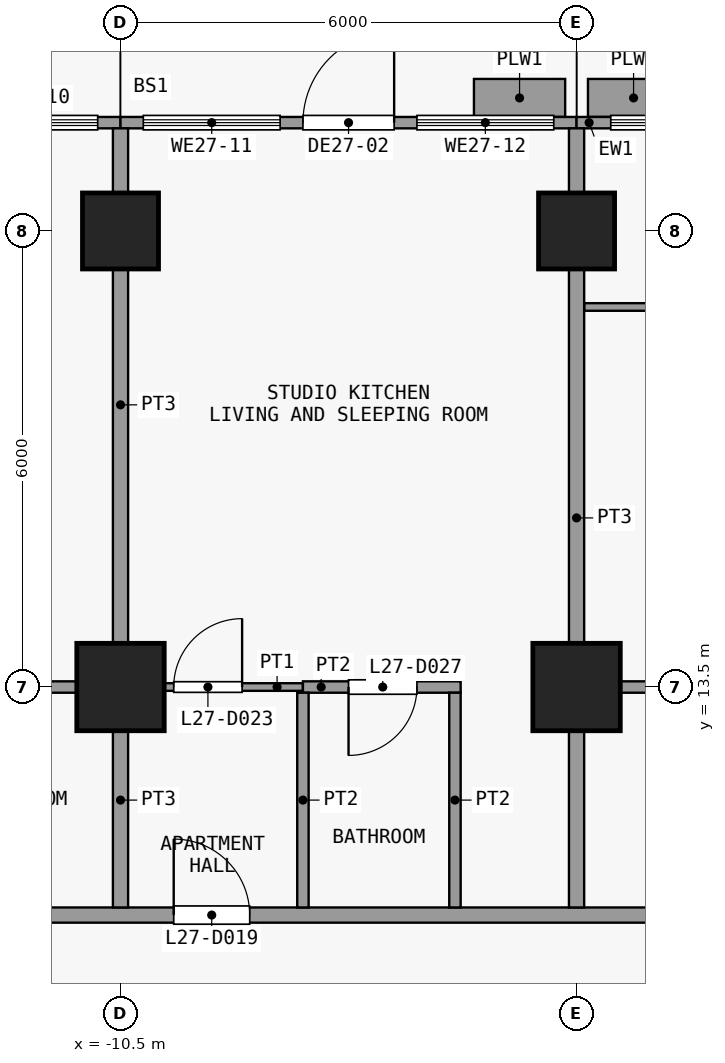
"""IFC4 building model, lengths in metres.
Left out: names, types, materials, properties, quantities, classifications, styles, units other than length and angle.
Written with IfcOpenShell. Run it as: python <this file> out.ifc"""

import sys

from ifc_helpers import new_model, si_unit, direction, frame, frame_2d, origin, origin_2d, place, context, subcontext, project, spatial, rectangle, extrude, element, fill, save


model = new_model("IFC4")
c1 = context("Model", 3, precision=1e-05, world=origin(), true_north=direction((0.0, 1.0)))
c2 = subcontext(c1, "Body", "Model", "MODEL_VIEW")
j1 = project(units=[si_unit("LENGTHUNIT", "METRE"), si_unit("PLANEANGLEUNIT", "RADIAN")], contexts=[c1])
p1 = place(None, origin())
s1 = spatial("IfcSite", under=j1, at=p1, CompositionType="ELEMENT")
p2 = place(p1, origin())
s2 = spatial("IfcBuilding", under=s1, at=p2, CompositionType="ELEMENT")
p3 = place(p2, frame((0.0, 0.0, 109.9)))
s3 = spatial("IfcBuildingStorey", under=s2, at=p3, CompositionType="ELEMENT", Elevation=109.9)
p4 = place(p3, frame((-10.5, 13.5, 0.0), z_axis=(0.0, 0.0, 1.0), x_axis=(1.0, 0.0, 0.0)))
e1 = element("IfcColumn", 1, at=p4, inside=s3, PredefinedType="COLUMN", context=c2, shape_type="SweptSolid", body=[
    extrude(rectangle(XDim=1.15, YDim=1.15, at=origin_2d()), origin(), (0.0, 0.0, 1.0), 3.6),
])
p5 = place(p3, frame((-10.5, 19.5, 0.0), z_axis=(0.0, 0.0, 1.0), x_axis=(1.0, 0.0, 0.0)))
e2 = element("IfcColumn", 2, at=p5, inside=s3, PredefinedType="COLUMN", context=c2, shape_type="SweptSolid", body=[
    extrude(rectangle(XDim=1.0, YDim=1.0, at=origin_2d()), origin(), (0.0, 0.0, 1.0), 3.6),
])
p6 = place(p3, frame((-4.5, 13.5, 0.0), z_axis=(0.0, 0.0, 1.0), x_axis=(1.0, 0.0, 0.0)))
e3 = element("IfcColumn", 3, at=p6, inside=s3, PredefinedType="COLUMN", context=c2, shape_type="SweptSolid", body=[
    extrude(rectangle(XDim=1.15, YDim=1.15, at=origin_2d()), origin(), (0.0, 0.0, 1.0), 3.6),
])
p7 = place(p3, frame((-4.5, 19.5, 0.0), z_axis=(0.0, 0.0, 1.0), x_axis=(1.0, 0.0, 0.0)))
e4 = element("IfcColumn", 4, at=p7, inside=s3, PredefinedType="COLUMN", context=c2, shape_type="SweptSolid", body=[
    extrude(rectangle(XDim=1.0, YDim=1.0, at=origin_2d()), origin(), (0.0, 0.0, 1.0), 3.6),
])
p8 = place(p3, frame((-16.425, 20.925, 0.0), z_axis=(0.0, 0.0, 1.0), x_axis=(1.0, 0.0, 0.0)))
e5 = element("IfcWall", 5, at=p8, inside=s3, PredefinedType="SOLIDWALL", context=c2, shape_type="SweptSolid", body=[
    extrude(rectangle(XDim=5.925, YDim=0.15, at=frame_2d((2.962, 0.0))), origin(), (0.0, 0.0, 1.0), 3.3),
])
p9 = place(p8, frame((2.325, 0.0, 0.0)))
e6 = element("IfcOpeningElement", 6, at=p9, cuts=e5, PredefinedType="OPENING", context=c2, shape_type="SweptSolid", body=[
    extrude(rectangle(XDim=1.2, YDim=2.4, at=frame_2d((0.6, 1.2))), frame((0.0, 0.085, 0.0), z_axis=(0.0, -1.0, 0.0), x_axis=(1.0, 0.0, 0.0)), (0.0, 0.0, 1.0), 0.17),
])
p10 = place(p8, frame((0.262, 0.0, 0.9)))
e7 = element("IfcOpeningElement", 7, at=p10, cuts=e5, PredefinedType="OPENING", context=c2, shape_type="SweptSolid", body=[
    extrude(rectangle(XDim=1.8, YDim=2.1, at=frame_2d((0.9, 1.05))), frame((0.0, 0.085, 0.0), z_axis=(0.0, -1.0, 0.0), x_axis=(1.0, 0.0, 0.0)), (0.0, 0.0, 1.0), 0.17),
])
p11 = place(p8, frame((3.825, 0.0, 0.9)))
e8 = element("IfcOpeningElement", 8, at=p11, cuts=e5, PredefinedType="OPENING", context=c2, shape_type="SweptSolid", body=[
    extrude(rectangle(XDim=1.8, YDim=2.1, at=frame_2d((0.9, 1.05))), frame((0.0, 0.085, 0.0), z_axis=(0.0, -1.0, 0.0), x_axis=(1.0, 0.0, 0.0)), (0.0, 0.0, 1.0), 0.17),
])
p12 = place(p3, frame((-10.5, 20.925, 0.0), z_axis=(0.0, 0.0, 1.0), x_axis=(1.0, 0.0, 0.0)))
e9 = element("IfcWall", 9, at=p12, inside=s3, PredefinedType="SOLIDWALL", context=c2, shape_type="SweptSolid", body=[
    extrude(rectangle(XDim=6.0, YDim=0.15, at=frame_2d((3.0, 0.0))), origin(), (0.0, 0.0, 1.0), 3.3),
])
p13 = place(p12, frame((2.4, 0.0, 0.0)))
e10 = element("IfcOpeningElement", 10, at=p13, cuts=e9, PredefinedType="OPENING", context=c2, shape_type="SweptSolid", body=[
    extrude(rectangle(XDim=1.2, YDim=2.4, at=frame_2d((0.6, 1.2))), frame((0.0, 0.085, 0.0), z_axis=(0.0, -1.0, 0.0), x_axis=(1.0, 0.0, 0.0)), (0.0, 0.0, 1.0), 0.17),
])
p14 = place(p12, frame((0.3, 0.0, 0.9)))
e11 = element("IfcOpeningElement", 11, at=p14, cuts=e9, PredefinedType="OPENING", context=c2, shape_type="SweptSolid", body=[
    extrude(rectangle(XDim=1.8, YDim=2.1, at=frame_2d((0.9, 1.05))), frame((0.0, 0.085, 0.0), z_axis=(0.0, -1.0, 0.0), x_axis=(1.0, 0.0, 0.0)), (0.0, 0.0, 1.0), 0.17),
])
p15 = place(p12, frame((3.9, 0.0, 0.9)))
e12 = element("IfcOpeningElement", 12, at=p15, cuts=e9, PredefinedType="OPENING", context=c2, shape_type="SweptSolid", body=[
    extrude(rectangle(XDim=1.8, YDim=2.1, at=frame_2d((0.9, 1.05))), frame((0.0, 0.085, 0.0), z_axis=(0.0, -1.0, 0.0), x_axis=(1.0, 0.0, 0.0)), (0.0, 0.0, 1.0), 0.17),
])
p16 = place(p3, frame((-5.85, 21.25, 0.0), z_axis=(0.0, 0.0, 1.0), x_axis=(1.0, 0.0, 0.0)))
e13 = element("IfcWall", 13, at=p16, inside=s3, PredefinedType="USERDEFINED", context=c2, shape_type="SweptSolid", body=[
    extrude(rectangle(XDim=1.2, YDim=0.5, at=frame_2d((0.6, 0.0))), origin(), (0.0, 0.0, 1.0), 0.9),
])
p17 = place(p3, frame((-4.5, 20.925, 0.0), z_axis=(0.0, 0.0, 1.0), x_axis=(1.0, 0.0, 0.0)))
e14 = element("IfcWall", 14, at=p17, inside=s3, PredefinedType="SOLIDWALL", context=c2, shape_type="SweptSolid", body=[
    extrude(rectangle(XDim=8.925, YDim=0.15, at=frame_2d((4.462, 0.0))), origin(), (0.0, 0.0, 1.0), 3.3),
])
p18 = place(p17, frame((3.9, 0.0, 0.0)))
e15 = element("IfcOpeningElement", 15, at=p18, cuts=e14, PredefinedType="OPENING", context=c2, shape_type="SweptSolid", body=[
    extrude(rectangle(XDim=1.2, YDim=2.4, at=frame_2d((0.6, 1.2))), frame((0.0, 0.085, 0.0), z_axis=(0.0, -1.0, 0.0), x_axis=(1.0, 0.0, 0.0)), (0.0, 0.0, 1.0), 0.17),
])
p19 = place(p17, frame((0.45, 0.0, 0.9)))
e16 = element("IfcOpeningElement", 16, at=p19, cuts=e14, PredefinedType="OPENING", context=c2, shape_type="SweptSolid", body=[
    extrude(rectangle(XDim=3.0, YDim=2.1, at=frame_2d((1.5, 1.05))), frame((0.0, 0.085, 0.0), z_axis=(0.0, -1.0, 0.0), x_axis=(1.0, 0.0, 0.0)), (0.0, 0.0, 1.0), 0.17),
])
p20 = place(p17, frame((5.512, 0.0, 0.9)))
e17 = element("IfcOpeningElement", 17, at=p20, cuts=e14, PredefinedType="OPENING", context=c2, shape_type="SweptSolid", body=[
    extrude(rectangle(XDim=3.0, YDim=2.1, at=frame_2d((1.5, 1.05))), frame((0.0, 0.085, 0.0), z_axis=(0.0, -1.0, 0.0), x_axis=(1.0, 0.0, 0.0)), (0.0, 0.0, 1.0), 0.17),
])
p21 = place(p3, frame((-4.35, 21.25, 0.0), z_axis=(0.0, 0.0, 1.0), x_axis=(1.0, 0.0, 0.0)))
e18 = element("IfcWall", 18, at=p21, inside=s3, PredefinedType="USERDEFINED", context=c2, shape_type="SweptSolid", body=[
    extrude(rectangle(XDim=1.2, YDim=0.5, at=frame_2d((0.6, 0.0))), origin(), (0.0, 0.0, 1.0), 0.9),
])
p22 = place(p3, frame((-23.85, 10.5, 0.0), z_axis=(0.0, 0.0, 1.0), x_axis=(1.0, 0.0, 0.0)))
e19 = element("IfcWall", 19, at=p22, inside=s3, PredefinedType="PARTITIONING", context=c2, shape_type="SweptSolid", body=[
    extrude(rectangle(XDim=47.7, YDim=0.2, at=frame_2d((23.85, 0.0))), origin(), (0.0, 0.0, 1.0), 3.3),
])
p23 = place(p22, frame((9.05, 0.0, 0.0)))
e20 = element("IfcOpeningElement", 20, at=p23, cuts=e19, PredefinedType="OPENING", context=c2, shape_type="SweptSolid", body=[
    extrude(rectangle(XDim=1.0, YDim=2.1, at=frame_2d((0.5, 1.05))), frame((0.0, 0.11, 0.0), z_axis=(0.0, -1.0, 0.0), x_axis=(1.0, 0.0, 0.0)), (0.0, 0.0, 1.0), 0.22),
])
p24 = place(p22, frame((14.05, 0.0, 0.0)))
e21 = element("IfcOpeningElement", 21, at=p24, cuts=e19, PredefinedType="OPENING", context=c2, shape_type="SweptSolid", body=[
    extrude(rectangle(XDim=1.0, YDim=2.1, at=frame_2d((0.5, 1.05))), frame((0.0, 0.11, 0.0), z_axis=(0.0, -1.0, 0.0), x_axis=(1.0, 0.0, 0.0)), (0.0, 0.0, 1.0), 0.22),
])
p25 = place(p22, frame((29.05, 0.0, 0.0)))
e22 = element("IfcOpeningElement", 22, at=p25, cuts=e19, PredefinedType="OPENING", context=c2, shape_type="SweptSolid", body=[
    extrude(rectangle(XDim=1.0, YDim=2.1, at=frame_2d((0.5, 1.05))), frame((0.0, 0.11, 0.0), z_axis=(0.0, -1.0, 0.0), x_axis=(1.0, 0.0, 0.0)), (0.0, 0.0, 1.0), 0.22),
])
p26 = place(p22, frame((41.05, 0.0, 0.0)))
e23 = element("IfcOpeningElement", 23, at=p26, cuts=e19, PredefinedType="OPENING", context=c2, shape_type="SweptSolid", body=[
    extrude(rectangle(XDim=1.0, YDim=2.1, at=frame_2d((0.5, 1.05))), frame((0.0, 0.11, 0.0), z_axis=(0.0, -1.0, 0.0), x_axis=(1.0, 0.0, 0.0)), (0.0, 0.0, 1.0), 0.22),
])
p27 = place(p3, frame((-10.5, 13.5, 0.0), z_axis=(0.0, 0.0, 1.0), x_axis=(1.0, 0.0, 0.0)))
e24 = element("IfcWall", 24, at=p27, inside=s3, PredefinedType="PARTITIONING", context=c2, shape_type="SweptSolid", body=[
    extrude(rectangle(XDim=2.4, YDim=0.1, at=frame_2d((1.2, 0.0))), origin(), (0.0, 0.0, 1.0), 3.3),
])
p28 = place(p27, frame((0.7, 0.0, 0.0)))
e25 = element("IfcOpeningElement", 25, at=p28, cuts=e24, PredefinedType="OPENING", context=c2, shape_type="SweptSolid", body=[
    extrude(rectangle(XDim=0.9, YDim=2.1, at=frame_2d((0.45, 1.05))), frame((0.0, 0.06, 0.0), z_axis=(0.0, -1.0, 0.0), x_axis=(1.0, 0.0, 0.0)), (0.0, 0.0, 1.0), 0.12),
])
p29 = place(p3, frame((-13.1, 13.5, 0.0), z_axis=(0.0, 0.0, 1.0), x_axis=(1.0, 0.0, 0.0)))
e26 = element("IfcWall", 26, at=p29, inside=s3, PredefinedType="PARTITIONING", context=c2, shape_type="SweptSolid", body=[
    extrude(rectangle(XDim=2.6, YDim=0.15, at=frame_2d((1.3, 0.0))), origin(), (0.0, 0.0, 1.0), 3.3),
])
p30 = place(p3, frame((-8.1, 13.5, 0.0), z_axis=(0.0, 0.0, 1.0), x_axis=(1.0, 0.0, 0.0)))
e27 = element("IfcWall", 27, at=p30, inside=s3, PredefinedType="PARTITIONING", context=c2, shape_type="SweptSolid", body=[
    extrude(rectangle(XDim=2.075, YDim=0.15, at=frame_2d((1.038, 0.0))), origin(), (0.0, 0.0, 1.0), 3.3),
])
p31 = place(p30, frame((0.6, 0.0, 0.0)))
e28 = element("IfcOpeningElement", 28, at=p31, cuts=e27, PredefinedType="OPENING", context=c2, shape_type="SweptSolid", body=[
    extrude(rectangle(XDim=0.9, YDim=2.1, at=frame_2d((0.45, 1.05))), frame((0.0, 0.085, 0.0), z_axis=(0.0, -1.0, 0.0), x_axis=(1.0, 0.0, 0.0)), (0.0, 0.0, 1.0), 0.17),
])
p32 = place(p3, frame((-4.4, 13.5, 0.0), z_axis=(0.0, 0.0, 1.0), x_axis=(1.0, 0.0, 0.0)))
e29 = element("IfcWall", 29, at=p32, inside=s3, PredefinedType="PARTITIONING", context=c2, shape_type="SweptSolid", body=[
    extrude(rectangle(XDim=8.9, YDim=0.15, at=frame_2d((4.45, 0.0))), origin(), (0.0, 0.0, 1.0), 3.3),
])
p33 = place(p32, frame((5.7, 0.0, 0.0)))
e30 = element("IfcOpeningElement", 30, at=p33, cuts=e29, PredefinedType="OPENING", context=c2, shape_type="SweptSolid", body=[
    extrude(rectangle(XDim=0.9, YDim=2.1, at=frame_2d((0.45, 1.05))), frame((0.0, 0.085, 0.0), z_axis=(0.0, -1.0, 0.0), x_axis=(1.0, 0.0, 0.0)), (0.0, 0.0, 1.0), 0.17),
])
p34 = place(p3, frame((-4.4, 18.5, 0.0), z_axis=(0.0, 0.0, 1.0), x_axis=(1.0, 0.0, 0.0)))
e31 = element("IfcWall", 31, at=p34, inside=s3, PredefinedType="PARTITIONING", context=c2, shape_type="SweptSolid", body=[
    extrude(rectangle(XDim=8.85, YDim=0.1, at=frame_2d((4.425, 0.0))), origin(), (0.0, 0.0, 1.0), 3.3),
])
p35 = place(p34, frame((4.0, 0.0, 0.0)))
e32 = element("IfcOpeningElement", 32, at=p35, cuts=e31, PredefinedType="OPENING", context=c2, shape_type="SweptSolid", body=[
    extrude(rectangle(XDim=0.9, YDim=2.1, at=frame_2d((0.45, 1.05))), frame((0.0, 0.06, 0.0), z_axis=(0.0, -1.0, 0.0), x_axis=(1.0, 0.0, 0.0)), (0.0, 0.0, 1.0), 0.12),
])
p36 = place(p3, frame((-10.5, 10.6, 0.0), z_axis=(0.0, 0.0, 1.0), x_axis=(0.0, 1.0, 0.0)))
e33 = element("IfcWall", 33, at=p36, inside=s3, PredefinedType="PARTITIONING", context=c2, shape_type="SweptSolid", body=[
    extrude(rectangle(XDim=2.825, YDim=0.2, at=frame_2d((1.413, 0.0))), origin(), (0.0, 0.0, 1.0), 3.3),
])
p37 = place(p3, frame((-10.5, 13.575, 0.0), z_axis=(0.0, 0.0, 1.0), x_axis=(0.0, 1.0, 0.0)))
e34 = element("IfcWall", 34, at=p37, inside=s3, PredefinedType="PARTITIONING", context=c2, shape_type="SweptSolid", body=[
    extrude(rectangle(XDim=7.275, YDim=0.2, at=frame_2d((3.638, 0.0))), origin(), (0.0, 0.0, 1.0), 3.3),
])
for number, where, z_axis, x_axis in (
    (35, (-8.1, 10.6, 0.0), (0.0, 0.0, 1.0), (0.0, 1.0, 0.0)),
    (36, (-6.1, 10.6, 0.0), (0.0, 0.0, 1.0), (0.0, 1.0, 0.0)),
):
    element("IfcWall", number, at=place(p3, frame(where, z_axis=z_axis, x_axis=x_axis)), inside=s3, PredefinedType="PARTITIONING", context=c2, shape_type="SweptSolid", body=[
        extrude(rectangle(XDim=2.825, YDim=0.15, at=frame_2d((1.413, 0.0))), origin(), (0.0, 0.0, 1.0), 3.3),
    ])
p38 = place(p3, frame((-4.5, 10.6, 0.0), z_axis=(0.0, 0.0, 1.0), x_axis=(0.0, 1.0, 0.0)))
e37 = element("IfcWall", 37, at=p38, inside=s3, PredefinedType="PARTITIONING", context=c2, shape_type="SweptSolid", body=[
    extrude(rectangle(XDim=10.25, YDim=0.2, at=frame_2d((5.125, 0.0))), origin(), (0.0, 0.0, 1.0), 3.3),
])
p39 = place(p11, origin())
e38 = element("IfcWindow", 38, at=p39, inside=s3, PartitioningType="SINGLE_PANEL", PredefinedType="WINDOW", context=c2, shape_type="SweptSolid", body=[
    extrude(rectangle(XDim=1.8, YDim=2.1, at=frame_2d((0.9, 1.05))), frame((0.0, 0.03, 0.0), z_axis=(0.0, -1.0, 0.0), x_axis=(1.0, 0.0, 0.0)), (0.0, 0.0, 1.0), 0.06),
])
fill(e8, e38)
p40 = place(p13, origin())
e39 = element("IfcDoor", 39, at=p40, inside=s3, OperationType="SINGLE_SWING_RIGHT", PredefinedType="DOOR", context=c2, shape_type="SweptSolid", body=[
    extrude(rectangle(XDim=1.2, YDim=2.4, at=frame_2d((0.6, 1.2))), frame((0.0, 0.025, 0.0), z_axis=(0.0, -1.0, 0.0), x_axis=(1.0, 0.0, 0.0)), (0.0, 0.0, 1.0), 0.05),
])
fill(e10, e39)
p41 = place(p14, origin())
e40 = element("IfcWindow", 40, at=p41, inside=s3, PartitioningType="SINGLE_PANEL", PredefinedType="WINDOW", context=c2, shape_type="SweptSolid", body=[
    extrude(rectangle(XDim=1.8, YDim=2.1, at=frame_2d((0.9, 1.05))), frame((0.0, 0.03, 0.0), z_axis=(0.0, -1.0, 0.0), x_axis=(1.0, 0.0, 0.0)), (0.0, 0.0, 1.0), 0.06),
])
fill(e11, e40)
p42 = place(p15, origin())
e41 = element("IfcWindow", 41, at=p42, inside=s3, PartitioningType="SINGLE_PANEL", PredefinedType="WINDOW", context=c2, shape_type="SweptSolid", body=[
    extrude(rectangle(XDim=1.8, YDim=2.1, at=frame_2d((0.9, 1.05))), frame((0.0, 0.03, 0.0), z_axis=(0.0, -1.0, 0.0), x_axis=(1.0, 0.0, 0.0)), (0.0, 0.0, 1.0), 0.06),
])
fill(e12, e41)
p43 = place(p19, origin())
e42 = element("IfcWindow", 42, at=p43, inside=s3, PartitioningType="SINGLE_PANEL", PredefinedType="WINDOW", context=c2, shape_type="SweptSolid", body=[
    extrude(rectangle(XDim=3.0, YDim=2.1, at=frame_2d((1.5, 1.05))), frame((0.0, 0.03, 0.0), z_axis=(0.0, -1.0, 0.0), x_axis=(1.0, 0.0, 0.0)), (0.0, 0.0, 1.0), 0.06),
])
fill(e16, e42)
p44 = place(p24, origin())
e43 = element("IfcDoor", 43, at=p44, inside=s3, OperationType="SINGLE_SWING_RIGHT", PredefinedType="DOOR", context=c2, shape_type="SweptSolid", body=[
    extrude(rectangle(XDim=1.0, YDim=2.1, at=frame_2d((0.5, 1.05))), frame((0.0, 0.025, 0.0), z_axis=(0.0, -1.0, 0.0), x_axis=(1.0, 0.0, 0.0)), (0.0, 0.0, 1.0), 0.05),
])
fill(e21, e43)
p45 = place(p28, origin())
e44 = element("IfcDoor", 44, at=p45, inside=s3, OperationType="SINGLE_SWING_LEFT", PredefinedType="DOOR", context=c2, shape_type="SweptSolid", body=[
    extrude(rectangle(XDim=0.9, YDim=2.1, at=frame_2d((0.45, 1.05))), frame((0.0, 0.025, 0.0), z_axis=(0.0, -1.0, 0.0), x_axis=(1.0, 0.0, 0.0)), (0.0, 0.0, 1.0), 0.05),
])
fill(e25, e44)
p46 = place(p31, origin())
e45 = element("IfcDoor", 45, at=p46, inside=s3, OperationType="SINGLE_SWING_LEFT", PredefinedType="DOOR", context=c2, shape_type="SweptSolid", body=[
    extrude(rectangle(XDim=0.9, YDim=2.1, at=frame_2d((0.45, 1.05))), frame((0.0, 0.025, 0.0), z_axis=(0.0, -1.0, 0.0), x_axis=(1.0, 0.0, 0.0)), (0.0, 0.0, 1.0), 0.05),
])
fill(e28, e45)
save(model, sys.argv[1])
